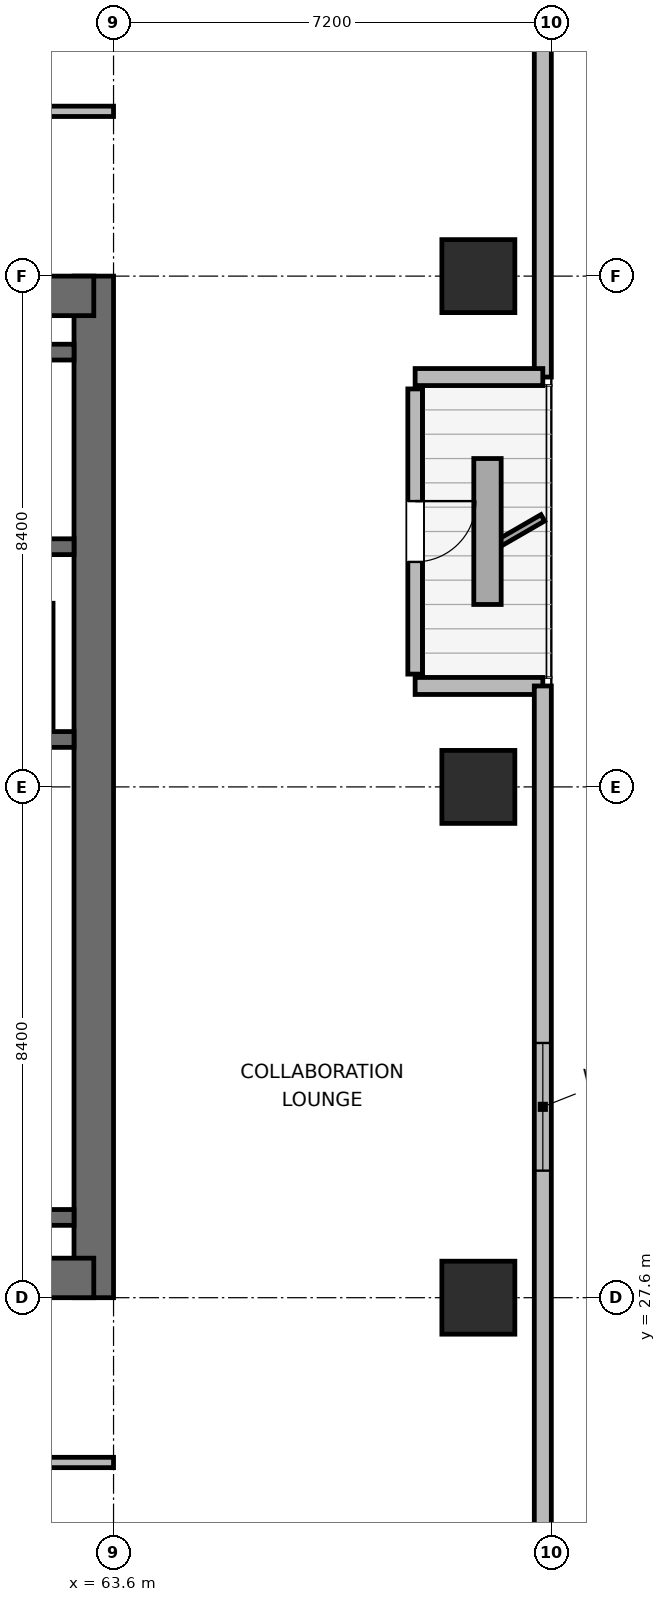
"""IFC4 building model, lengths in metres.
Left out: names, types, materials, properties, quantities, classifications, styles, units other than length and angle.
Written with IfcOpenShell. Run it as: python <this file> out.ifc"""

import sys

from ifc_helpers import new_model, si_unit, direction, frame, frame_2d, origin, origin_2d, place, context, subcontext, project, spatial, rectangle, extrude, element, fill, save


model = new_model("IFC4")
c1 = context("Model", 3, precision=1e-05, world=origin(), true_north=direction((0.0, 1.0)))
c2 = subcontext(c1, "Body", "Model", "MODEL_VIEW")
j1 = project(units=[si_unit("LENGTHUNIT", "METRE"), si_unit("PLANEANGLEUNIT", "RADIAN")], contexts=[c1])
p1 = place(None, origin())
s1 = spatial("IfcSite", under=j1, at=p1, CompositionType="ELEMENT")
p2 = place(p1, origin())
s2 = spatial("IfcBuilding", under=s1, at=p2, CompositionType="ELEMENT")
p3 = place(p2, frame((0.0, 0.0, 214.8)))
s3 = spatial("IfcBuildingStorey", under=s2, at=p3, CompositionType="ELEMENT", Elevation=214.8)
p4 = place(p3, frame((63.275, 27.6, 0.0), z_axis=(0.0, 0.0, 1.0), x_axis=(0.0, 1.0, 0.0)))
e1 = element("IfcWall", 1, at=p4, inside=s3, PredefinedType="SHEAR", context=c2, shape_type="SweptSolid", body=[
    extrude(rectangle(XDim=16.8, YDim=0.65, at=frame_2d((8.4, 0.0))), origin(), (0.0, 0.0, 1.0), 4.5),
])
p5 = place(p3, frame((53.925, 27.925, 0.0), z_axis=(0.0, 0.0, 1.0), x_axis=(1.0, 0.0, 0.0)))
e2 = element("IfcWall", 2, at=p5, inside=s3, PredefinedType="SHEAR", context=c2, shape_type="SweptSolid", body=[
    extrude(rectangle(XDim=9.35, YDim=0.65, at=frame_2d((4.675, 0.0))), origin(), (0.0, 0.0, 1.0), 4.5),
])
p6 = place(p5, frame((3.975, 0.0, 0.0)))
e3 = element("IfcOpeningElement", 3, at=p6, cuts=e2, PredefinedType="OPENING", context=c2, shape_type="SweptSolid", body=[
    extrude(rectangle(XDim=1.05, YDim=2.04, at=frame_2d((0.525, 1.02))), frame((0.0, 0.335, 0.0), z_axis=(0.0, -1.0, 0.0), x_axis=(1.0, 0.0, 0.0)), (0.0, 0.0, 1.0), 0.67),
])
p7 = place(p3, frame((53.925, 44.075, 0.0), z_axis=(0.0, 0.0, 1.0), x_axis=(1.0, 0.0, 0.0)))
e4 = element("IfcWall", 4, at=p7, inside=s3, PredefinedType="SHEAR", context=c2, shape_type="SweptSolid", body=[
    extrude(rectangle(XDim=9.35, YDim=0.65, at=frame_2d((4.675, 0.0))), origin(), (0.0, 0.0, 1.0), 4.5),
])
for number, where, z_axis, x_axis in (
    (5, (58.89, 28.92, 0.0), (0.0, 0.0, 1.0), (1.0, 0.0, 0.0)),
    (6, (58.89, 36.78, 0.0), (0.0, 0.0, 1.0), (1.0, 0.0, 0.0)),
):
    element("IfcWall", number, at=place(p3, frame(where, z_axis=z_axis, x_axis=x_axis)), inside=s3, PredefinedType="SHEAR", context=c2, shape_type="SweptSolid", body=[
        extrude(rectangle(XDim=4.06, YDim=0.26, at=frame_2d((2.03, 0.0))), origin(), (0.0, 0.0, 1.0), 4.5),
    ])
p8 = place(p3, frame((54.25, 39.95, 0.0), z_axis=(0.0, 0.0, 1.0), x_axis=(1.0, 0.0, 0.0)))
e7 = element("IfcWall", 7, at=p8, inside=s3, PredefinedType="SHEAR", context=c2, shape_type="SweptSolid", body=[
    extrude(rectangle(XDim=8.7, YDim=0.26, at=frame_2d((4.35, 0.0))), origin(), (0.0, 0.0, 1.0), 4.5),
])
p9 = place(p8, frame((0.95, 0.0, 0.0)))
e8 = element("IfcOpeningElement", 8, at=p9, cuts=e7, PredefinedType="OPENING", context=c2, shape_type="SweptSolid", body=[
    extrude(rectangle(XDim=1.0, YDim=2.04, at=frame_2d((0.5, 1.02))), frame((0.0, 0.14, 0.0), z_axis=(0.0, -1.0, 0.0), x_axis=(1.0, 0.0, 0.0)), (0.0, 0.0, 1.0), 0.28),
])
p10 = place(p3, frame((54.25, 43.15, 0.0), z_axis=(0.0, 0.0, 1.0), x_axis=(1.0, 0.0, 0.0)))
e9 = element("IfcWall", 9, at=p10, inside=s3, PredefinedType="SHEAR", context=c2, shape_type="SweptSolid", body=[
    extrude(rectangle(XDim=8.7, YDim=0.26, at=frame_2d((4.35, 0.0))), origin(), (0.0, 0.0, 1.0), 4.5),
])
for number, where, z_axis, x_axis in (
    (10, (69.6, 27.6, 0.0), (0.0, 0.0, 1.0), (1.0, 0.0, 0.0)),
    (11, (69.6, 36.0, 0.0), (0.0, 0.0, 1.0), (1.0, 0.0, 0.0)),
    (12, (69.6, 44.4, 0.0), (0.0, 0.0, 1.0), (1.0, 0.0, 0.0)),
):
    element("IfcColumn", number, at=place(p3, frame(where, z_axis=z_axis, x_axis=x_axis)), inside=s3, PredefinedType="COLUMN", context=c2, shape_type="SweptSolid", body=[
        extrude(rectangle(XDim=1.2, YDim=1.2, at=origin_2d()), origin(), (0.0, 0.0, 1.0), 4.5),
    ])
p11 = place(p3, frame((70.66, 57.182, 0.0), z_axis=(0.0, 0.0, 1.0), x_axis=(0.0, -1.0, 0.0)))
e13 = element("IfcWall", 13, at=p11, inside=s3, PredefinedType="SOLIDWALL", context=c2, shape_type="SweptSolid", body=[
    extrude(rectangle(XDim=14.442, YDim=0.28, at=frame_2d((7.221, 0.0))), origin(), (0.0, 0.0, 1.0), 4.28),
])
p12 = place(p3, frame((70.66, 42.74, 0.0), z_axis=(0.0, 0.0, 1.0), x_axis=(-1.0, 0.0, 0.0)))
e14 = element("IfcWall", 14, at=p12, inside=s3, PredefinedType="SOLIDWALL", context=c2, shape_type="SweptSolid", body=[
    extrude(rectangle(XDim=2.1, YDim=0.28, at=frame_2d((1.05, 0.0))), origin(), (0.0, 0.0, 1.0), 3.716),
])
p13 = place(p3, frame((68.56, 42.545, 0.0), z_axis=(0.0, 0.0, 1.0), x_axis=(0.0, -1.0, 0.0)))
e15 = element("IfcWall", 15, at=p13, inside=s3, PredefinedType="SOLIDWALL", context=c2, shape_type="SweptSolid", body=[
    extrude(rectangle(XDim=4.69, YDim=0.24, at=frame_2d((2.345, 0.0))), origin(), (0.0, 0.0, 1.0), 3.848),
])
p14 = place(p13, frame((1.845, 0.0, 0.0)))
e16 = element("IfcOpeningElement", 16, at=p14, cuts=e15, PredefinedType="OPENING", context=c2, shape_type="SweptSolid", body=[
    extrude(rectangle(XDim=1.0, YDim=2.02, at=frame_2d((0.5, 1.01))), frame((0.0, 0.13, 0.0), z_axis=(0.0, -1.0, 0.0), x_axis=(1.0, 0.0, 0.0)), (0.0, 0.0, 1.0), 0.26),
])
p15 = place(p3, frame((68.56, 37.66, 0.0), z_axis=(0.0, 0.0, 1.0), x_axis=(1.0, 0.0, 0.0)))
e17 = element("IfcWall", 17, at=p15, inside=s3, PredefinedType="SOLIDWALL", context=c2, shape_type="SweptSolid", body=[
    extrude(rectangle(XDim=2.1, YDim=0.28, at=frame_2d((1.05, 0.0))), origin(), (0.0, 0.0, 1.0), 3.716),
])
p16 = place(p3, frame((70.66, 37.66, 0.0), z_axis=(0.0, 0.0, 1.0), x_axis=(0.0, -1.0, 0.0)))
e18 = element("IfcWall", 18, at=p16, inside=s3, PredefinedType="SOLIDWALL", context=c2, shape_type="SweptSolid", body=[
    extrude(rectangle(XDim=13.842, YDim=0.28, at=frame_2d((6.921, 0.0))), origin(), (0.0, 0.0, 1.0), 4.28),
])
p17 = place(p16, frame((5.871, 0.0, 0.85)))
e19 = element("IfcOpeningElement", 19, at=p17, cuts=e18, PredefinedType="OPENING", context=c2, shape_type="SweptSolid", body=[
    extrude(rectangle(XDim=2.1, YDim=1.05, at=frame_2d((1.05, 0.525))), frame((0.0, 0.15, 0.0), z_axis=(0.0, -1.0, 0.0), x_axis=(1.0, 0.0, 0.0)), (0.0, 0.0, 1.0), 0.3),
])
p18 = place(p3, frame((62.5, 36.98, 0.0), z_axis=(0.0, 0.0, 1.0), x_axis=(0.0, 1.0, 0.0)))
e20 = element("IfcWall", 20, at=p18, inside=s3, PredefinedType="PARTITIONING", context=c2, shape_type="SweptSolid", body=[
    extrude(rectangle(XDim=2.04, YDim=0.21, at=frame_2d((1.02, 0.0))), origin(), (0.0, 0.0, 1.0), 4.28),
])
p19 = place(p3, frame((29.8, 24.89, 0.0), z_axis=(0.0, 0.0, 1.0), x_axis=(1.0, 0.0, 0.0)))
e21 = element("IfcWall", 21, at=p19, inside=s3, PredefinedType="PARTITIONING", context=c2, shape_type="SweptSolid", body=[
    extrude(rectangle(XDim=33.8, YDim=0.17, at=frame_2d((16.9, 0.0))), origin(), (0.0, 0.0, 1.0), 4.28),
])
p20 = place(p19, frame((2.74, 0.0, 0.0)))
e22 = element("IfcOpeningElement", 22, at=p20, cuts=e21, PredefinedType="OPENING", context=c2, shape_type="SweptSolid", body=[
    extrude(rectangle(XDim=0.95, YDim=2.04, at=frame_2d((0.475, 1.02))), frame((0.0, 0.095, 0.0), z_axis=(0.0, -1.0, 0.0), x_axis=(1.0, 0.0, 0.0)), (0.0, 0.0, 1.0), 0.19),
])
p21 = place(p19, frame((8.575, 0.0, 0.0)))
e23 = element("IfcOpeningElement", 23, at=p21, cuts=e21, PredefinedType="OPENING", context=c2, shape_type="SweptSolid", body=[
    extrude(rectangle(XDim=0.95, YDim=2.04, at=frame_2d((0.475, 1.02))), frame((0.0, 0.095, 0.0), z_axis=(0.0, -1.0, 0.0), x_axis=(1.0, 0.0, 0.0)), (0.0, 0.0, 1.0), 0.19),
])
p22 = place(p19, frame((13.81, 0.0, 0.0)))
e24 = element("IfcOpeningElement", 24, at=p22, cuts=e21, PredefinedType="OPENING", context=c2, shape_type="SweptSolid", body=[
    extrude(rectangle(XDim=0.95, YDim=2.04, at=frame_2d((0.475, 1.02))), frame((0.0, 0.095, 0.0), z_axis=(0.0, -1.0, 0.0), x_axis=(1.0, 0.0, 0.0)), (0.0, 0.0, 1.0), 0.19),
])
p23 = place(p19, frame((19.04, 0.0, 0.0)))
e25 = element("IfcOpeningElement", 25, at=p23, cuts=e21, PredefinedType="OPENING", context=c2, shape_type="SweptSolid", body=[
    extrude(rectangle(XDim=0.95, YDim=2.04, at=frame_2d((0.475, 1.02))), frame((0.0, 0.095, 0.0), z_axis=(0.0, -1.0, 0.0), x_axis=(1.0, 0.0, 0.0)), (0.0, 0.0, 1.0), 0.19),
])
p24 = place(p19, frame((24.275, 0.0, 0.0)))
e26 = element("IfcOpeningElement", 26, at=p24, cuts=e21, PredefinedType="OPENING", context=c2, shape_type="SweptSolid", body=[
    extrude(rectangle(XDim=0.95, YDim=2.04, at=frame_2d((0.475, 1.02))), frame((0.0, 0.095, 0.0), z_axis=(0.0, -1.0, 0.0), x_axis=(1.0, 0.0, 0.0)), (0.0, 0.0, 1.0), 0.19),
])
p25 = place(p19, frame((30.11, 0.0, 0.0)))
e27 = element("IfcOpeningElement", 27, at=p25, cuts=e21, PredefinedType="OPENING", context=c2, shape_type="SweptSolid", body=[
    extrude(rectangle(XDim=0.95, YDim=2.04, at=frame_2d((0.475, 1.02))), frame((0.0, 0.095, 0.0), z_axis=(0.0, -1.0, 0.0), x_axis=(1.0, 0.0, 0.0)), (0.0, 0.0, 1.0), 0.19),
])
p26 = place(p3, frame((29.8, 47.11, 0.0), z_axis=(0.0, 0.0, 1.0), x_axis=(1.0, 0.0, 0.0)))
e28 = element("IfcWall", 28, at=p26, inside=s3, PredefinedType="PARTITIONING", context=c2, shape_type="SweptSolid", body=[
    extrude(rectangle(XDim=33.8, YDim=0.17, at=frame_2d((16.9, 0.0))), origin(), (0.0, 0.0, 1.0), 4.28),
])
p27 = place(p26, frame((11.27, 0.0, 0.0)))
e29 = element("IfcOpeningElement", 29, at=p27, cuts=e28, PredefinedType="OPENING", context=c2, shape_type="SweptSolid", body=[
    extrude(rectangle(XDim=0.95, YDim=2.04, at=frame_2d((0.475, 1.02))), frame((0.0, 0.095, 0.0), z_axis=(0.0, -1.0, 0.0), x_axis=(1.0, 0.0, 0.0)), (0.0, 0.0, 1.0), 0.19),
])
p28 = place(p26, frame((28.17, 0.0, 0.0)))
e30 = element("IfcOpeningElement", 30, at=p28, cuts=e28, PredefinedType="OPENING", context=c2, shape_type="SweptSolid", body=[
    extrude(rectangle(XDim=0.95, YDim=2.04, at=frame_2d((0.475, 1.02))), frame((0.0, 0.095, 0.0), z_axis=(0.0, -1.0, 0.0), x_axis=(1.0, 0.0, 0.0)), (0.0, 0.0, 1.0), 0.19),
])
p29 = place(p14, origin())
e31 = element("IfcDoor", 31, at=p29, inside=s3, OperationType="SINGLE_SWING_LEFT", PredefinedType="DOOR", context=c2, shape_type="SweptSolid", body=[
    extrude(rectangle(XDim=1.0, YDim=2.02, at=frame_2d((0.5, 1.01))), frame((0.0, 0.025, 0.0), z_axis=(0.0, -1.0, 0.0), x_axis=(1.0, 0.0, 0.0)), (0.0, 0.0, 1.0), 0.05),
])
fill(e16, e31)
p30 = place(p17, origin())
e32 = element("IfcWindow", 32, at=p30, inside=s3, PartitioningType="SINGLE_PANEL", PredefinedType="WINDOW", context=c2, shape_type="SweptSolid", body=[
    extrude(rectangle(XDim=2.1, YDim=1.05, at=frame_2d((1.05, 0.525))), frame((0.0, 0.03, 0.0), z_axis=(0.0, -1.0, 0.0), x_axis=(1.0, 0.0, 0.0)), (0.0, 0.0, 1.0), 0.06),
])
fill(e19, e32)
save(model, sys.argv[1])
